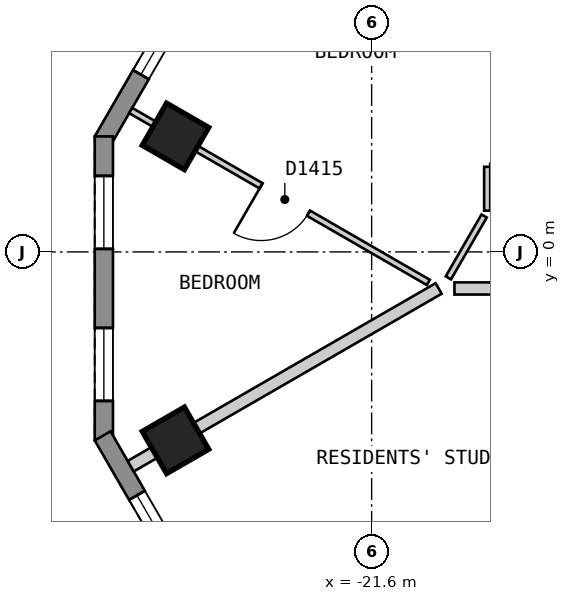
"""IFC4 building model, lengths in metres.
Left out: names, types, materials, properties, quantities, classifications, styles, units other than length and angle.
Written with IfcOpenShell. Run it as: python <this file> out.ifc"""

import sys

from ifc_helpers import new_model, si_unit, direction, frame, frame_2d, origin, origin_2d, place, context, subcontext, project, spatial, polyline, rectangle, outline, extrude, element, fill, save


model = new_model("IFC4")
c1 = context("Model", 3, precision=1e-05, world=origin(), true_north=direction((0.0, 1.0)))
c2 = subcontext(c1, "Body", "Model", "MODEL_VIEW")
j1 = project(units=[si_unit("LENGTHUNIT", "METRE"), si_unit("PLANEANGLEUNIT", "RADIAN")], contexts=[c1])
p1 = place(None, origin())
s1 = spatial("IfcSite", under=j1, at=p1, CompositionType="ELEMENT")
p2 = place(p1, origin())
s2 = spatial("IfcBuilding", under=s1, at=p2, CompositionType="ELEMENT")
p3 = place(p2, frame((0.0, 0.0, 166.2)))
s3 = spatial("IfcBuildingStorey", under=s2, at=p3, CompositionType="ELEMENT", Elevation=166.2)
for number, where, z_axis, x_axis in (
    (1, (-24.826, 1.9, 0.0), (0.0, 0.0, 1.0), (-0.5, -0.866, 0.0)),
    (2, (-24.826, -3.099, 0.0), (0.0, 0.0, 1.0), (0.5, -0.866, 0.0)),
):
    element("IfcColumn", number, at=place(p3, frame(where, z_axis=z_axis, x_axis=x_axis)), inside=s3, PredefinedType="COLUMN", context=c2, shape_type="SweptSolid", body=[
        extrude(rectangle(XDim=0.8, YDim=0.8, at=origin_2d()), origin(), (0.0, 0.0, 1.0), 3.0),
    ])
p4 = place(p3, frame((-14.592, 21.625, 0.0), z_axis=(0.0, 0.0, 1.0), x_axis=(-0.500010537973, -0.866019319597, 0.0)))
e3 = element("IfcWall", 3, at=p4, inside=s3, PredefinedType="SOLIDWALL", context=c2, shape_type="SweptSolid", body=[
    extrude(outline(polyline([(0.0, -0.15), (22.863, -0.15), (22.783, 0.15), (0.08, 0.15), (0.0, -0.15)])), origin(), (0.0, 0.0, 1.0), 2.7),
])
p5 = place(p4, frame((1.259, 0.0, 0.15)))
e4 = element("IfcOpeningElement", 4, at=p5, cuts=e3, PredefinedType="OPENING", context=c2, shape_type="SweptSolid", body=[
    extrude(rectangle(XDim=1.5, YDim=2.1, at=frame_2d((0.75, 1.05))), frame((0.0, 0.16, 0.0), z_axis=(0.0, -1.0, 0.0), x_axis=(1.0, 0.0, 0.0)), (0.0, 0.0, 1.0), 0.32),
])
p6 = place(p4, frame((3.952, 0.0, 0.15)))
e5 = element("IfcOpeningElement", 5, at=p6, cuts=e3, PredefinedType="OPENING", context=c2, shape_type="SweptSolid", body=[
    extrude(rectangle(XDim=1.5, YDim=2.1, at=frame_2d((0.75, 1.05))), frame((0.0, 0.16, 0.0), z_axis=(0.0, -1.0, 0.0), x_axis=(1.0, 0.0, 0.0)), (0.0, 0.0, 1.0), 0.32),
])
p7 = place(p4, frame((6.644, 0.0, 0.15)))
e6 = element("IfcOpeningElement", 6, at=p7, cuts=e3, PredefinedType="OPENING", context=c2, shape_type="SweptSolid", body=[
    extrude(rectangle(XDim=1.5, YDim=2.1, at=frame_2d((0.75, 1.05))), frame((0.0, 0.16, 0.0), z_axis=(0.0, -1.0, 0.0), x_axis=(1.0, 0.0, 0.0)), (0.0, 0.0, 1.0), 0.32),
])
p8 = place(p4, frame((9.335, 0.0, 0.15)))
e7 = element("IfcOpeningElement", 7, at=p8, cuts=e3, PredefinedType="OPENING", context=c2, shape_type="SweptSolid", body=[
    extrude(rectangle(XDim=1.5, YDim=2.1, at=frame_2d((0.75, 1.05))), frame((0.0, 0.16, 0.0), z_axis=(0.0, -1.0, 0.0), x_axis=(1.0, 0.0, 0.0)), (0.0, 0.0, 1.0), 0.32),
])
p9 = place(p4, frame((12.028, 0.0, 0.15)))
e8 = element("IfcOpeningElement", 8, at=p9, cuts=e3, PredefinedType="OPENING", context=c2, shape_type="SweptSolid", body=[
    extrude(rectangle(XDim=1.5, YDim=2.1, at=frame_2d((0.75, 1.05))), frame((0.0, 0.16, 0.0), z_axis=(0.0, -1.0, 0.0), x_axis=(1.0, 0.0, 0.0)), (0.0, 0.0, 1.0), 0.32),
])
p10 = place(p4, frame((14.72, 0.0, 0.15)))
e9 = element("IfcOpeningElement", 9, at=p10, cuts=e3, PredefinedType="OPENING", context=c2, shape_type="SweptSolid", body=[
    extrude(rectangle(XDim=1.5, YDim=2.1, at=frame_2d((0.75, 1.05))), frame((0.0, 0.16, 0.0), z_axis=(0.0, -1.0, 0.0), x_axis=(1.0, 0.0, 0.0)), (0.0, 0.0, 1.0), 0.32),
])
p11 = place(p4, frame((17.411, 0.0, 0.15)))
e10 = element("IfcOpeningElement", 10, at=p11, cuts=e3, PredefinedType="OPENING", context=c2, shape_type="SweptSolid", body=[
    extrude(rectangle(XDim=1.5, YDim=2.1, at=frame_2d((0.75, 1.05))), frame((0.0, 0.16, 0.0), z_axis=(0.0, -1.0, 0.0), x_axis=(1.0, 0.0, 0.0)), (0.0, 0.0, 1.0), 0.32),
])
p12 = place(p4, frame((20.104, 0.0, 0.15)))
e11 = element("IfcOpeningElement", 11, at=p12, cuts=e3, PredefinedType="OPENING", context=c2, shape_type="SweptSolid", body=[
    extrude(rectangle(XDim=1.5, YDim=2.1, at=frame_2d((0.75, 1.05))), frame((0.0, 0.16, 0.0), z_axis=(0.0, -1.0, 0.0), x_axis=(1.0, 0.0, 0.0)), (0.0, 0.0, 1.0), 0.32),
])
p13 = place(p3, frame((-26.004, 1.9, 0.0), z_axis=(0.0, 0.0, 1.0), x_axis=(0.0, -1.0, 0.0)))
e12 = element("IfcWall", 12, at=p13, inside=s3, PredefinedType="SOLIDWALL", context=c2, shape_type="SweptSolid", body=[
    extrude(outline(polyline([(0.0, -0.15), (5.0, -0.15), (4.92, 0.15), (0.08, 0.15), (0.0, -0.15)])), origin(), (0.0, 0.0, 1.0), 2.7),
])
p14 = place(p13, frame((0.65, 0.0, 0.15)))
e13 = element("IfcOpeningElement", 13, at=p14, cuts=e12, PredefinedType="OPENING", context=c2, shape_type="SweptSolid", body=[
    extrude(rectangle(XDim=1.2, YDim=2.1, at=frame_2d((0.6, 1.05))), frame((0.0, 0.16, 0.0), z_axis=(0.0, -1.0, 0.0), x_axis=(1.0, 0.0, 0.0)), (0.0, 0.0, 1.0), 0.32),
])
p15 = place(p13, frame((3.15, 0.0, 0.15)))
e14 = element("IfcOpeningElement", 14, at=p15, cuts=e12, PredefinedType="OPENING", context=c2, shape_type="SweptSolid", body=[
    extrude(rectangle(XDim=1.2, YDim=2.1, at=frame_2d((0.6, 1.05))), frame((0.0, 0.16, 0.0), z_axis=(0.0, -1.0, 0.0), x_axis=(1.0, 0.0, 0.0)), (0.0, 0.0, 1.0), 0.32),
])
p16 = place(p3, frame((-26.024, -3.025, 0.0), z_axis=(0.0, 0.0, 1.0), x_axis=(0.500018670445, -0.86601462413, 0.0)))
e15 = element("IfcWall", 15, at=p16, inside=s3, PredefinedType="SOLIDWALL", context=c2, shape_type="SweptSolid", body=[
    extrude(outline(polyline([(0.0, -0.15), (20.785, -0.15), (20.705, 0.15), (0.08, 0.15), (0.0, -0.15)])), origin(), (0.0, 0.0, 1.0), 2.7),
])
p17 = place(p16, frame((1.13, 0.0, 0.15)))
e16 = element("IfcOpeningElement", 16, at=p17, cuts=e15, PredefinedType="OPENING", context=c2, shape_type="SweptSolid", body=[
    extrude(rectangle(XDim=1.5, YDim=2.1, at=frame_2d((0.75, 1.05))), frame((0.0, 0.16, 0.0), z_axis=(0.0, -1.0, 0.0), x_axis=(1.0, 0.0, 0.0)), (0.0, 0.0, 1.0), 0.32),
])
p18 = place(p16, frame((3.562, 0.0, 0.15)))
e17 = element("IfcOpeningElement", 17, at=p18, cuts=e15, PredefinedType="OPENING", context=c2, shape_type="SweptSolid", body=[
    extrude(rectangle(XDim=1.5, YDim=2.1, at=frame_2d((0.75, 1.05))), frame((0.0, 0.16, 0.0), z_axis=(0.0, -1.0, 0.0), x_axis=(1.0, 0.0, 0.0)), (0.0, 0.0, 1.0), 0.32),
])
p19 = place(p16, frame((5.994, 0.0, 0.15)))
e18 = element("IfcOpeningElement", 18, at=p19, cuts=e15, PredefinedType="OPENING", context=c2, shape_type="SweptSolid", body=[
    extrude(rectangle(XDim=1.5, YDim=2.1, at=frame_2d((0.75, 1.05))), frame((0.0, 0.16, 0.0), z_axis=(0.0, -1.0, 0.0), x_axis=(1.0, 0.0, 0.0)), (0.0, 0.0, 1.0), 0.32),
])
p20 = place(p16, frame((8.425, 0.0, 0.15)))
e19 = element("IfcOpeningElement", 19, at=p20, cuts=e15, PredefinedType="OPENING", context=c2, shape_type="SweptSolid", body=[
    extrude(rectangle(XDim=1.5, YDim=2.1, at=frame_2d((0.75, 1.05))), frame((0.0, 0.16, 0.0), z_axis=(0.0, -1.0, 0.0), x_axis=(1.0, 0.0, 0.0)), (0.0, 0.0, 1.0), 0.32),
])
p21 = place(p16, frame((10.857, 0.0, 0.15)))
e20 = element("IfcOpeningElement", 20, at=p21, cuts=e15, PredefinedType="OPENING", context=c2, shape_type="SweptSolid", body=[
    extrude(rectangle(XDim=1.5, YDim=2.1, at=frame_2d((0.75, 1.05))), frame((0.0, 0.16, 0.0), z_axis=(0.0, -1.0, 0.0), x_axis=(1.0, 0.0, 0.0)), (0.0, 0.0, 1.0), 0.32),
])
p22 = place(p16, frame((13.289, 0.0, 0.15)))
e21 = element("IfcOpeningElement", 21, at=p22, cuts=e15, PredefinedType="OPENING", context=c2, shape_type="SweptSolid", body=[
    extrude(rectangle(XDim=1.5, YDim=2.1, at=frame_2d((0.75, 1.05))), frame((0.0, 0.16, 0.0), z_axis=(0.0, -1.0, 0.0), x_axis=(1.0, 0.0, 0.0)), (0.0, 0.0, 1.0), 0.32),
])
p23 = place(p16, frame((15.722, 0.0, 0.15)))
e22 = element("IfcOpeningElement", 22, at=p23, cuts=e15, PredefinedType="OPENING", context=c2, shape_type="SweptSolid", body=[
    extrude(rectangle(XDim=1.5, YDim=2.1, at=frame_2d((0.75, 1.05))), frame((0.0, 0.16, 0.0), z_axis=(0.0, -1.0, 0.0), x_axis=(1.0, 0.0, 0.0)), (0.0, 0.0, 1.0), 0.32),
])
p24 = place(p16, frame((18.154, 0.0, 0.15)))
e23 = element("IfcOpeningElement", 23, at=p24, cuts=e15, PredefinedType="OPENING", context=c2, shape_type="SweptSolid", body=[
    extrude(rectangle(XDim=1.5, YDim=2.1, at=frame_2d((0.75, 1.05))), frame((0.0, 0.16, 0.0), z_axis=(0.0, -1.0, 0.0), x_axis=(1.0, 0.0, 0.0)), (0.0, 0.0, 1.0), 0.32),
])
p25 = place(p3, frame((-22.87, 6.987, 0.0), z_axis=(0.0, 0.0, 1.0), x_axis=(0.866022959057, -0.500004234368, 0.0)))
e24 = element("IfcWall", 24, at=p25, inside=s3, PredefinedType="PARTITIONING", context=c2, shape_type="SweptSolid", body=[
    extrude(rectangle(XDim=10.0, YDim=0.1, at=frame_2d((5.0, 0.0))), origin(), (0.0, 0.0, 1.0), 2.7),
])
p26 = place(p25, frame((2.5, 0.0, 0.0)))
e25 = element("IfcOpeningElement", 25, at=p26, cuts=e24, PredefinedType="OPENING", context=c2, shape_type="SweptSolid", body=[
    extrude(rectangle(XDim=0.9, YDim=2.1, at=frame_2d((0.45, 1.05))), frame((0.0, 0.06, 0.0), z_axis=(0.0, -1.0, 0.0), x_axis=(1.0, 0.0, 0.0)), (0.0, 0.0, 1.0), 0.12),
])
p27 = place(p3, frame((-25.562, 2.325, 0.0), z_axis=(0.0, 0.0, 1.0), x_axis=(0.865998530728, -0.500046542611, 0.0)))
e26 = element("IfcWall", 26, at=p27, inside=s3, PredefinedType="PARTITIONING", context=c2, shape_type="SweptSolid", body=[
    extrude(rectangle(XDim=5.651, YDim=0.1, at=frame_2d((2.826, 0.0))), origin(), (0.0, 0.0, 1.0), 2.7),
])
p28 = place(p27, frame((2.476, 0.0, 0.0)))
e27 = element("IfcOpeningElement", 27, at=p28, cuts=e26, PredefinedType="OPENING", context=c2, shape_type="SweptSolid", body=[
    extrude(rectangle(XDim=0.9, YDim=2.1, at=frame_2d((0.45, 1.05))), frame((0.0, 0.06, 0.0), z_axis=(0.0, -1.0, 0.0), x_axis=(1.0, 0.0, 0.0)), (0.0, 0.0, 1.0), 0.12),
])
p29 = place(p3, frame((-19.65, 1.4, 0.0), z_axis=(0.0, 0.0, 1.0), x_axis=(1.0, 0.0, 0.0)))
e28 = element("IfcWall", 28, at=p29, inside=s3, PredefinedType="PARTITIONING", context=c2, shape_type="SweptSolid", body=[
    extrude(rectangle(XDim=0.309, YDim=0.1, at=frame_2d((0.154, 0.0))), origin(), (0.0, 0.0, 1.0), 2.7),
])
p30 = place(p3, frame((-20.338, -0.427, 0.0), z_axis=(0.0, 0.0, 1.0), x_axis=(0.500069990121, 0.865984991198, 0.0)))
e29 = element("IfcWall", 29, at=p30, inside=s3, PredefinedType="PARTITIONING", context=c2, shape_type="SweptSolid", body=[
    extrude(rectangle(XDim=1.176, YDim=0.1, at=frame_2d((0.588, 0.0))), origin(), (0.0, 0.0, 1.0), 2.7),
])
p31 = place(p3, frame((-19.7, 0.678, 0.0), z_axis=(0.0, 0.0, 1.0), x_axis=(0.0, 1.0, 0.0)))
e30 = element("IfcWall", 30, at=p31, inside=s3, PredefinedType="PARTITIONING", context=c2, shape_type="SweptSolid", body=[
    extrude(rectangle(XDim=0.722, YDim=0.1, at=frame_2d((0.361, 0.0))), origin(), (0.0, 0.0, 1.0), 2.7),
])
p32 = place(p3, frame((-20.238, -0.601, 0.0), z_axis=(0.0, 0.0, 1.0), x_axis=(1.0, 0.0, 0.0)))
e31 = element("IfcWall", 31, at=p32, inside=s3, PredefinedType="PARTITIONING", context=c2, shape_type="SweptSolid", body=[
    extrude(rectangle(XDim=4.65, YDim=0.2, at=frame_2d((2.325, 0.0))), origin(), (0.0, 0.0, 1.0), 2.7),
])
p33 = place(p3, frame((-23.13, -7.737, 0.0), z_axis=(0.0, 0.0, 1.0), x_axis=(0.86598451299, 0.500070818246, 0.0)))
e32 = element("IfcWall", 32, at=p33, inside=s3, PredefinedType="PARTITIONING", context=c2, shape_type="SweptSolid", body=[
    extrude(rectangle(XDim=8.695, YDim=0.2, at=frame_2d((4.348, 0.0))), origin(), (0.0, 0.0, 1.0), 2.7),
])
p34 = place(p3, frame((-25.563, -3.524, 0.0), z_axis=(0.0, 0.0, 1.0), x_axis=(0.866128586522, 0.499821239653, 0.0)))
e33 = element("IfcWall", 33, at=p34, inside=s3, PredefinedType="PARTITIONING", context=c2, shape_type="SweptSolid", body=[
    extrude(rectangle(XDim=5.848, YDim=0.2, at=frame_2d((2.924, 0.0))), origin(), (0.0, 0.0, 1.0), 2.7),
])
p35 = place(p12, origin())
e34 = element("IfcWindow", 34, at=p35, inside=s3, PartitioningType="SINGLE_PANEL", PredefinedType="WINDOW", context=c2, shape_type="SweptSolid", body=[
    extrude(rectangle(XDim=1.5, YDim=2.1, at=frame_2d((0.75, 1.05))), frame((0.0, 0.03, 0.0), z_axis=(0.0, -1.0, 0.0), x_axis=(1.0, 0.0, 0.0)), (0.0, 0.0, 1.0), 0.06),
])
fill(e11, e34)
p36 = place(p14, origin())
e35 = element("IfcWindow", 35, at=p36, inside=s3, PartitioningType="SINGLE_PANEL", PredefinedType="WINDOW", context=c2, shape_type="SweptSolid", body=[
    extrude(rectangle(XDim=1.2, YDim=2.1, at=frame_2d((0.6, 1.05))), frame((0.0, 0.03, 0.0), z_axis=(0.0, -1.0, 0.0), x_axis=(1.0, 0.0, 0.0)), (0.0, 0.0, 1.0), 0.06),
])
fill(e13, e35)
p37 = place(p15, origin())
e36 = element("IfcWindow", 36, at=p37, inside=s3, PartitioningType="SINGLE_PANEL", PredefinedType="WINDOW", context=c2, shape_type="SweptSolid", body=[
    extrude(rectangle(XDim=1.2, YDim=2.1, at=frame_2d((0.6, 1.05))), frame((0.0, 0.03, 0.0), z_axis=(0.0, -1.0, 0.0), x_axis=(1.0, 0.0, 0.0)), (0.0, 0.0, 1.0), 0.06),
])
fill(e14, e36)
p38 = place(p17, origin())
e37 = element("IfcWindow", 37, at=p38, inside=s3, PartitioningType="SINGLE_PANEL", PredefinedType="WINDOW", context=c2, shape_type="SweptSolid", body=[
    extrude(rectangle(XDim=1.5, YDim=2.1, at=frame_2d((0.75, 1.05))), frame((0.0, 0.03, 0.0), z_axis=(0.0, -1.0, 0.0), x_axis=(1.0, 0.0, 0.0)), (0.0, 0.0, 1.0), 0.06),
])
fill(e16, e37)
p39 = place(p28, origin())
e38 = element("IfcDoor", 38, at=p39, inside=s3, OperationType="SINGLE_SWING_LEFT", PredefinedType="DOOR", context=c2, shape_type="SweptSolid", body=[
    extrude(rectangle(XDim=0.9, YDim=2.1, at=frame_2d((0.45, 1.05))), frame((0.0, 0.025, 0.0), z_axis=(0.0, -1.0, 0.0), x_axis=(1.0, 0.0, 0.0)), (0.0, 0.0, 1.0), 0.05),
])
fill(e27, e38)
save(model, sys.argv[1])
